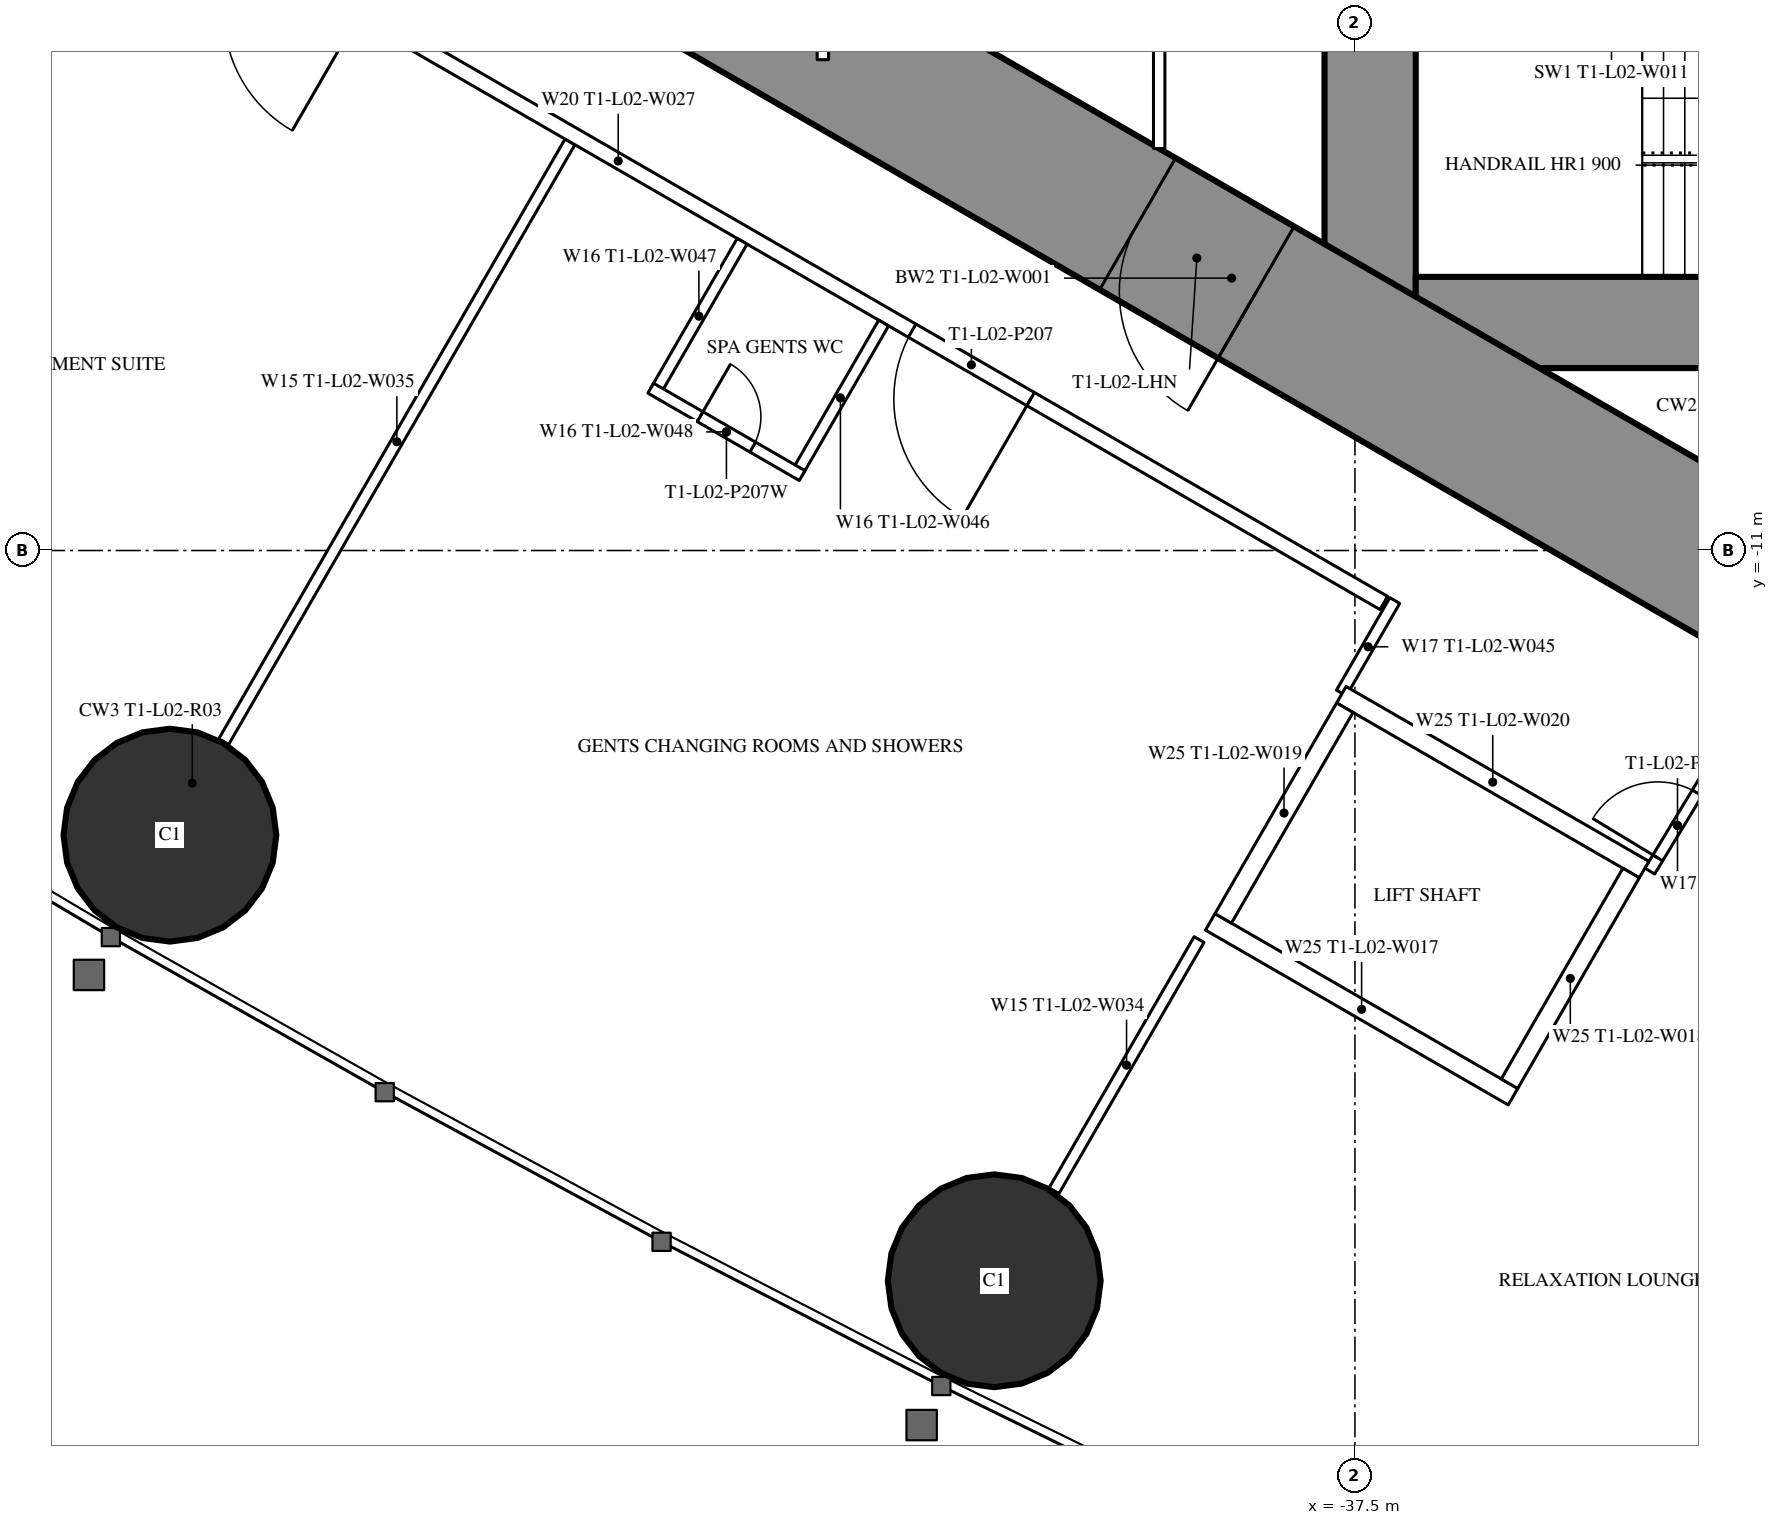
"""IFC4 building model, lengths in metres.
Left out: names, types, materials, properties, quantities, classifications, styles, units other than length and angle.
Written with IfcOpenShell. Run it as: python <this file> out.ifc"""

import sys

from ifc_helpers import new_model, si_unit, direction, frame, frame_2d, origin, origin_2d, place, context, subcontext, project, spatial, rectangle, hollow_circle, extrude, element, fill, save


model = new_model("IFC4")
c1 = context("Model", 3, precision=1e-05, world=origin(), true_north=direction((0.0, 1.0)))
c2 = subcontext(c1, "Body", "Model", "MODEL_VIEW")
j1 = project(units=[si_unit("LENGTHUNIT", "METRE"), si_unit("PLANEANGLEUNIT", "RADIAN")], contexts=[c1])
p1 = place(None, origin())
s1 = spatial("IfcSite", under=j1, at=p1, CompositionType="ELEMENT")
p2 = place(p1, origin())
s2 = spatial("IfcBuilding", under=s1, at=p2, CompositionType="ELEMENT")
p3 = place(p2, frame((0.0, 0.0, 12.6)))
s3 = spatial("IfcBuildingStorey", under=s2, at=p3, CompositionType="ELEMENT", Elevation=12.6)
for number, where, z_axis, x_axis in (
    (1, (-53.09, -14.745, 0.0), (0.0, 0.0, 1.0), (1.0, 0.0, 0.0)),
    (2, (-42.245, -20.607, 0.0), (0.0, 0.0, 1.0), (1.0, 0.0, 0.0)),
):
    element("IfcColumn", number, at=place(p3, frame(where, z_axis=z_axis, x_axis=x_axis)), inside=s3, PredefinedType="COLUMN", context=c2, shape_type="SweptSolid", body=[
        extrude(hollow_circle(Radius=1.4, WallThickness=0.12, at=origin_2d()), origin(), (0.0, 0.0, 1.0), 5.4),
    ])
p4 = place(p3, frame((-37.3, 8.6, 0.0), z_axis=(0.0, 0.0, 1.0), x_axis=(0.0, -1.0, 0.0)))
e3 = element("IfcWall", 3, at=p4, inside=s3, PredefinedType="SHEAR", context=c2, shape_type="SweptSolid", body=[
    extrude(rectangle(XDim=17.2, YDim=1.2, at=frame_2d((8.6, 0.0))), origin(), (0.0, 0.0, 1.0), 5.4),
])
p5 = place(p4, frame((7.7, 0.0, 0.0)))
e4 = element("IfcOpeningElement", 4, at=p5, cuts=e3, PredefinedType="OPENING", context=c2, shape_type="SweptSolid", body=[
    extrude(rectangle(XDim=1.8, YDim=2.2, at=frame_2d((0.9, 1.1))), frame((0.0, 0.61, 0.0), z_axis=(0.0, -1.0, 0.0), x_axis=(1.0, 0.0, 0.0)), (0.0, 0.0, 1.0), 1.22),
])
p6 = place(p3, frame((-28.3, -8.0, 0.0), z_axis=(0.0, 0.0, 1.0), x_axis=(-1.0, 0.0, 0.0)))
e5 = element("IfcWall", 5, at=p6, inside=s3, PredefinedType="SHEAR", context=c2, shape_type="SweptSolid", body=[
    extrude(rectangle(XDim=8.4, YDim=1.2, at=frame_2d((4.2, 0.0))), origin(), (0.0, 0.0, 1.0), 5.4),
])
p7 = place(p6, frame((0.25, 0.0, 0.0)))
e6 = element("IfcOpeningElement", 6, at=p7, cuts=e5, PredefinedType="OPENING", context=c2, shape_type="SweptSolid", body=[
    extrude(rectangle(XDim=1.0, YDim=2.2, at=frame_2d((0.5, 1.1))), frame((0.0, 0.61, 0.0), z_axis=(0.0, -1.0, 0.0), x_axis=(1.0, 0.0, 0.0)), (0.0, 0.0, 1.0), 1.22),
])
p8 = place(p3, frame((-27.2, -14.3, 0.0), z_axis=(0.0, 0.0, 1.0), x_axis=(-0.866024044937, 0.500002353585, 0.0)))
e7 = element("IfcWall", 7, at=p8, inside=s3, PredefinedType="SHEAR", context=c2, shape_type="SweptSolid", body=[
    extrude(rectangle(XDim=27.533, YDim=2.0, at=frame_2d((13.767, 0.0))), origin(), (0.0, 0.0, 1.0), 5.4),
])
p9 = place(p8, frame((4.6, 0.0, 0.0)))
e8 = element("IfcOpeningElement", 8, at=p9, cuts=e7, PredefinedType="OPENING", context=c2, shape_type="SweptSolid", body=[
    extrude(rectangle(XDim=1.0, YDim=2.2, at=frame_2d((0.5, 1.1))), frame((0.0, 1.01, 0.0), z_axis=(0.0, -1.0, 0.0), x_axis=(1.0, 0.0, 0.0)), (0.0, 0.0, 1.0), 2.02),
])
p10 = place(p8, frame((13.395, 0.0, 0.0)))
e9 = element("IfcOpeningElement", 9, at=p10, cuts=e7, PredefinedType="OPENING", context=c2, shape_type="SweptSolid", body=[
    extrude(rectangle(XDim=1.8, YDim=2.2, at=frame_2d((0.9, 1.1))), frame((0.0, 1.01, 0.0), z_axis=(0.0, -1.0, 0.0), x_axis=(1.0, 0.0, 0.0)), (0.0, 0.0, 1.0), 2.02),
])
p11 = place(p3, frame((-47.827, -5.624, 0.0), z_axis=(0.0, 0.0, 1.0), x_axis=(-0.499995404498, -0.866028056982, 0.0)))
e10 = element("IfcWall", 10, at=p11, inside=s3, PredefinedType="PARTITIONING", context=c2, shape_type="SweptSolid", body=[
    extrude(rectangle(XDim=9.11, YDim=0.15, at=frame_2d((4.555, 0.0))), origin(), (0.0, 0.0, 1.0), 4.15),
])
p12 = place(p3, frame((-39.551, -16.118, 0.0), z_axis=(0.0, 0.0, 1.0), x_axis=(-0.499986503906, -0.866033195618, 0.0)))
e11 = element("IfcWall", 11, at=p12, inside=s3, PredefinedType="PARTITIONING", context=c2, shape_type="SweptSolid", body=[
    extrude(rectangle(XDim=3.815, YDim=0.15, at=frame_2d((1.907, 0.0))), origin(), (0.0, 0.0, 1.0), 5.15),
])
p13 = place(p3, frame((-27.5, -17.244, 0.0), z_axis=(0.0, 0.0, 1.0), x_axis=(-0.866027347857, 0.499996632752, 0.0)))
e12 = element("IfcWall", 12, at=p13, inside=s3, PredefinedType="PARTITIONING", context=c2, shape_type="SweptSolid", body=[
    extrude(rectangle(XDim=6.269, YDim=0.2, at=frame_2d((3.135, 0.0))), origin(), (0.0, 0.0, 1.0), 4.25),
])
p14 = place(p3, frame((-37.12, -11.69, 0.0), z_axis=(0.0, 0.0, 1.0), x_axis=(-0.866028803602, 0.499994111297, 0.0)))
e13 = element("IfcWall", 13, at=p14, inside=s3, PredefinedType="PARTITIONING", context=c2, shape_type="SweptSolid", body=[
    extrude(rectangle(XDim=23.26, YDim=0.2, at=frame_2d((11.63, 0.0))), origin(), (0.0, 0.0, 1.0), 4.25),
])
p15 = place(p14, frame((20.909, 0.0, 0.0)))
e14 = element("IfcOpeningElement", 14, at=p15, cuts=e13, PredefinedType="OPENING", context=c2, shape_type="SweptSolid", body=[
    extrude(rectangle(XDim=1.8, YDim=2.2, at=frame_2d((0.9, 1.1))), frame((0.0, 0.11, 0.0), z_axis=(0.0, -1.0, 0.0), x_axis=(1.0, 0.0, 0.0)), (0.0, 0.0, 1.0), 0.22),
])
p16 = place(p14, frame((15.544, 0.0, 0.0)))
e15 = element("IfcOpeningElement", 15, at=p16, cuts=e13, PredefinedType="OPENING", context=c2, shape_type="SweptSolid", body=[
    extrude(rectangle(XDim=1.8, YDim=2.2, at=frame_2d((0.9, 1.1))), frame((0.0, 0.11, 0.0), z_axis=(0.0, -1.0, 0.0), x_axis=(1.0, 0.0, 0.0)), (0.0, 0.0, 1.0), 0.22),
])
p17 = place(p14, frame((5.365, 0.0, 0.0)))
e16 = element("IfcOpeningElement", 16, at=p17, cuts=e13, PredefinedType="OPENING", context=c2, shape_type="SweptSolid", body=[
    extrude(rectangle(XDim=1.8, YDim=2.2, at=frame_2d((0.9, 1.1))), frame((0.0, 0.11, 0.0), z_axis=(0.0, -1.0, 0.0), x_axis=(1.0, 0.0, 0.0)), (0.0, 0.0, 1.0), 0.22),
])
p18 = place(p3, frame((-36.976, -11.658, 0.0), z_axis=(0.0, 0.0, 1.0), x_axis=(-0.50008355685, -0.86597715684, 0.0)))
e17 = element("IfcWall", 17, at=p18, inside=s3, PredefinedType="PARTITIONING", context=c2, shape_type="SweptSolid", body=[
    extrude(rectangle(XDim=1.405, YDim=0.15, at=frame_2d((0.702, 0.0))), origin(), (0.0, 0.0, 1.0), 5.15),
])
p19 = place(p3, frame((-33.621, -15.218, 0.0), z_axis=(0.0, 0.0, 1.0), x_axis=(0.518424923641, 0.855123148177, 0.0)))
e18 = element("IfcWall", 18, at=p19, inside=s3, PredefinedType="PARTITIONING", context=c2, shape_type="SweptSolid", body=[
    extrude(rectangle(XDim=1.405, YDim=0.15, at=frame_2d((0.703, 0.0))), origin(), (0.0, 0.0, 1.0), 5.15),
])
p20 = place(p19, frame((0.203, 0.0, 0.0)))
e19 = element("IfcOpeningElement", 19, at=p20, cuts=e18, PredefinedType="OPENING", context=c2, shape_type="SweptSolid", body=[
    extrude(rectangle(XDim=1.0, YDim=2.2, at=frame_2d((0.5, 1.1))), frame((0.0, 0.085, 0.0), z_axis=(0.0, -1.0, 0.0), x_axis=(1.0, 0.0, 0.0)), (0.0, 0.0, 1.0), 0.17),
])
p21 = place(p3, frame((-40.075, 1.2, 0.0), z_axis=(0.0, 0.0, 1.0), x_axis=(0.0, -1.0, 0.0)))
e20 = element("IfcWall", 20, at=p21, inside=s3, PredefinedType="PARTITIONING", context=c2, shape_type="SweptSolid", body=[
    extrude(rectangle(XDim=6.912, YDim=0.15, at=frame_2d((3.456, 0.0))), origin(), (0.0, 0.0, 1.0), 5.15),
])
p22 = place(p21, frame((2.556, 0.0, 0.0)))
e21 = element("IfcOpeningElement", 21, at=p22, cuts=e20, PredefinedType="OPENING", context=c2, shape_type="SweptSolid", body=[
    extrude(rectangle(XDim=1.8, YDim=2.2, at=frame_2d((0.9, 1.1))), frame((0.0, 0.085, 0.0), z_axis=(0.0, -1.0, 0.0), x_axis=(1.0, 0.0, 0.0)), (0.0, 0.0, 1.0), 0.17),
])
p23 = place(p3, frame((-44.5, 4.543, 0.0), z_axis=(0.0, 0.0, 1.0), x_axis=(0.0, -1.0, 0.0)))
e22 = element("IfcWall", 22, at=p23, inside=s3, PredefinedType="PARTITIONING", context=c2, shape_type="SweptSolid", body=[
    extrude(rectangle(XDim=9.085, YDim=0.15, at=frame_2d((4.543, 0.0))), origin(), (0.0, 0.0, 1.0), 5.15),
])
p24 = place(p23, frame((1.771, 0.0, 0.0)))
e23 = element("IfcOpeningElement", 23, at=p24, cuts=e22, PredefinedType="OPENING", context=c2, shape_type="SweptSolid", body=[
    extrude(rectangle(XDim=1.0, YDim=2.2, at=frame_2d((0.5, 1.1))), frame((0.0, 0.085, 0.0), z_axis=(0.0, -1.0, 0.0), x_axis=(1.0, 0.0, 0.0)), (0.0, 0.0, 1.0), 0.17),
])
p25 = place(p23, frame((6.314, 0.0, 0.0)))
e24 = element("IfcOpeningElement", 24, at=p25, cuts=e22, PredefinedType="OPENING", context=c2, shape_type="SweptSolid", body=[
    extrude(rectangle(XDim=1.0, YDim=2.2, at=frame_2d((0.5, 1.1))), frame((0.0, 0.085, 0.0), z_axis=(0.0, -1.0, 0.0), x_axis=(1.0, 0.0, 0.0)), (0.0, 0.0, 1.0), 0.17),
])
for number, where, z_axis, x_axis in (
    (25, (-43.7, -8.007, 0.0), (0.0, 0.0, 1.0), (-0.5, -0.866, 0.0)),
    (26, (-45.562, -6.932, 0.0), (0.0, 0.0, 1.0), (-0.5, -0.866, 0.0)),
):
    element("IfcWall", number, at=place(p3, frame(where, z_axis=z_axis, x_axis=x_axis)), inside=s3, PredefinedType="PARTITIONING", context=c2, shape_type="SweptSolid", body=[
        extrude(rectangle(XDim=2.275, YDim=0.15, at=frame_2d((1.137, 0.0))), origin(), (0.0, 0.0, 1.0), 5.15),
    ])
p26 = place(p3, frame((-44.773, -10.014, 0.0), z_axis=(0.0, 0.0, 1.0), x_axis=(-0.86602648383, 0.499998129301, 0.0)))
e27 = element("IfcWall", 27, at=p26, inside=s3, PredefinedType="PARTITIONING", context=c2, shape_type="SweptSolid", body=[
    extrude(rectangle(XDim=2.3, YDim=0.15, at=frame_2d((1.15, 0.0))), origin(), (0.0, 0.0, 1.0), 5.15),
])
p27 = place(p26, frame((0.75, 0.0, 0.0)))
e28 = element("IfcOpeningElement", 28, at=p27, cuts=e27, PredefinedType="OPENING", context=c2, shape_type="SweptSolid", body=[
    extrude(rectangle(XDim=0.8, YDim=2.2, at=frame_2d((0.4, 1.1))), frame((0.0, 0.085, 0.0), z_axis=(0.0, -1.0, 0.0), x_axis=(1.0, 0.0, 0.0)), (0.0, 0.0, 1.0), 0.17),
])
p28 = place(p3, frame((-33.696, -15.197, 0.0), z_axis=(0.0, 0.0, 1.0), x_axis=(-0.865976953817, 0.500083908417, 0.0)))
e29 = element("IfcWall", 29, at=p28, inside=s3, PredefinedType="PARTITIONING", context=c2, shape_type="SweptSolid", body=[
    extrude(rectangle(XDim=4.599, YDim=0.25, at=frame_2d((2.3, 0.0))), origin(), (0.0, 0.0, 1.0), 5.15),
])
p29 = place(p3, frame((-35.42, -18.186, 0.0), z_axis=(0.0, 0.0, 1.0), x_axis=(-0.865990227814, 0.50006092162, 0.0)))
e30 = element("IfcWall", 30, at=p29, inside=s3, PredefinedType="PARTITIONING", context=c2, shape_type="SweptSolid", body=[
    extrude(rectangle(XDim=4.6, YDim=0.25, at=frame_2d((2.3, 0.0))), origin(), (0.0, 0.0, 1.0), 5.15),
])
p30 = place(p3, frame((-33.866, -15.243, 0.0), z_axis=(0.0, 0.0, 1.0), x_axis=(-0.499929347863, -0.866066190972, 0.0)))
e31 = element("IfcWall", 31, at=p30, inside=s3, PredefinedType="PARTITIONING", context=c2, shape_type="SweptSolid", body=[
    extrude(rectangle(XDim=3.201, YDim=0.25, at=frame_2d((1.6, 0.0))), origin(), (0.0, 0.0, 1.0), 5.15),
])
p31 = place(p3, frame((-37.633, -13.068, 0.0), z_axis=(0.0, 0.0, 1.0), x_axis=(-0.499872130319, -0.866099216793, 0.0)))
e32 = element("IfcWall", 32, at=p31, inside=s3, PredefinedType="PARTITIONING", context=c2, shape_type="SweptSolid", body=[
    extrude(rectangle(XDim=3.2, YDim=0.25, at=frame_2d((1.6, 0.0))), origin(), (0.0, 0.0, 1.0), 5.15),
])
p32 = place(p17, origin())
e33 = element("IfcDoor", 33, at=p32, inside=s3, OperationType="DOUBLE_DOOR_SINGLE_SWING", PredefinedType="DOOR", context=c2, shape_type="SweptSolid", body=[
    extrude(rectangle(XDim=1.8, YDim=2.2, at=frame_2d((0.9, 1.1))), frame((0.0, 0.025, 0.0), z_axis=(0.0, -1.0, 0.0), x_axis=(1.0, 0.0, 0.0)), (0.0, 0.0, 1.0), 0.05),
])
fill(e16, e33)
p33 = place(p20, origin())
e34 = element("IfcDoor", 34, at=p33, inside=s3, OperationType="SINGLE_SWING_LEFT", PredefinedType="DOOR", context=c2, shape_type="SweptSolid", body=[
    extrude(rectangle(XDim=1.0, YDim=2.2, at=frame_2d((0.5, 1.1))), frame((0.0, 0.025, 0.0), z_axis=(0.0, -1.0, 0.0), x_axis=(1.0, 0.0, 0.0)), (0.0, 0.0, 1.0), 0.05),
])
fill(e19, e34)
p34 = place(p10, origin())
e35 = element("IfcDoor", 35, at=p34, inside=s3, OperationType="DOUBLE_DOOR_SINGLE_SWING", PredefinedType="DOOR", context=c2, shape_type="SweptSolid", body=[
    extrude(rectangle(XDim=1.8, YDim=2.2, at=frame_2d((0.9, 1.1))), frame((0.0, 0.025, 0.0), z_axis=(0.0, -1.0, 0.0), x_axis=(1.0, 0.0, 0.0)), (0.0, 0.0, 1.0), 0.05),
])
fill(e9, e35)
p35 = place(p27, origin())
e36 = element("IfcDoor", 36, at=p35, inside=s3, OperationType="SINGLE_SWING_RIGHT", PredefinedType="DOOR", context=c2, shape_type="SweptSolid", body=[
    extrude(rectangle(XDim=0.8, YDim=2.2, at=frame_2d((0.4, 1.1))), frame((0.0, 0.025, 0.0), z_axis=(0.0, -1.0, 0.0), x_axis=(1.0, 0.0, 0.0)), (0.0, 0.0, 1.0), 0.05),
])
fill(e28, e36)
save(model, sys.argv[1])
